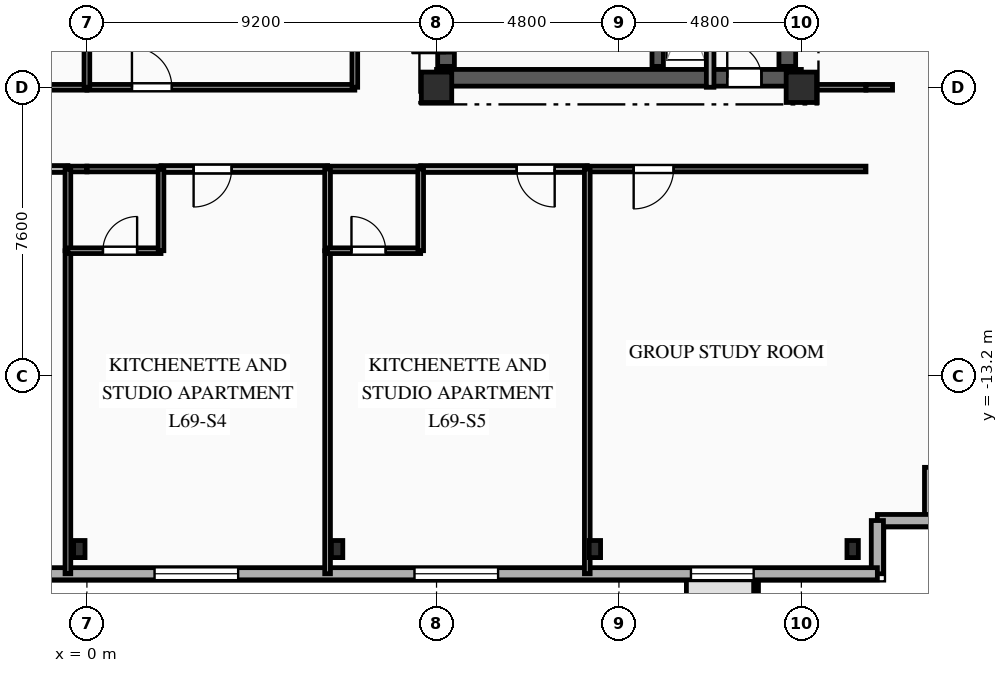
"""IFC4 building model, lengths in metres.
Left out: names, types, materials, properties, quantities, classifications, styles, units other than length and angle.
Written with IfcOpenShell. Run it as: python <this file> out.ifc"""

import sys

from ifc_helpers import new_model, si_unit, direction, frame, frame_2d, origin, origin_2d, place, context, subcontext, project, spatial, rectangle, i_section, extrude, element, fill, save


model = new_model("IFC4")
c1 = context("Model", 3, precision=1e-05, world=origin(), true_north=direction((0.0, 1.0)))
c2 = subcontext(c1, "Body", "Model", "MODEL_VIEW")
j1 = project(units=[si_unit("LENGTHUNIT", "METRE"), si_unit("PLANEANGLEUNIT", "RADIAN")], contexts=[c1])
p1 = place(None, origin())
s1 = spatial("IfcSite", under=j1, at=p1, CompositionType="ELEMENT")
p2 = place(p1, origin())
s2 = spatial("IfcBuilding", under=s1, at=p2, CompositionType="ELEMENT")
p3 = place(p2, frame((0.0, 0.0, 245.05)))
s3 = spatial("IfcBuildingStorey", under=s2, at=p3, CompositionType="ELEMENT", Elevation=245.05)
for number, where, z_axis, x_axis in (
    (1, (9.2, -5.6, 0.0), (0.0, 0.0, 1.0), (1.0, 0.0, 0.0)),
    (2, (18.8, -5.6, 0.0), (0.0, 0.0, 1.0), (1.0, 0.0, 0.0)),
):
    element("IfcColumn", number, at=place(p3, frame(where, z_axis=z_axis, x_axis=x_axis)), inside=s3, PredefinedType="COLUMN", context=c2, shape_type="SweptSolid", body=[
        extrude(rectangle(XDim=0.8, YDim=0.8, at=origin_2d()), origin(), (0.0, 0.0, 1.0), 3.35),
    ])
for number, where, z_axis, x_axis in (
    (3, (-0.2, -17.75, 0.0), (0.0, 0.0, 1.0), (1.0, 0.0, 0.0)),
    (4, (6.583, -17.75, 0.0), (0.0, 0.0, 1.0), (1.0, 0.0, 0.0)),
    (5, (13.367, -17.75, 0.0), (0.0, 0.0, 1.0), (1.0, 0.0, 0.0)),
    (6, (20.15, -17.75, 0.0), (0.0, 0.0, 1.0), (1.0, 0.0, 0.0)),
):
    element("IfcColumn", number, at=place(p3, frame(where, z_axis=z_axis, x_axis=x_axis)), inside=s3, PredefinedType="COLUMN", context=c2, shape_type="SweptSolid", body=[
        extrude(i_section(OverallWidth=0.3, OverallDepth=0.45, WebThickness=0.014, FlangeThickness=0.026, FilletRadius=0.027, at=origin_2d()), origin(), (0.0, 0.0, 1.0), 3.35),
    ])
for number, where, z_axis, x_axis in (
    (7, (22.2, -15.6, 0.0), (0.0, 0.0, 1.0), (0.0, -1.0, 0.0)),
    (8, (22.2, -17.0, 0.0), (0.0, 0.0, 1.0), (-1.0, 0.0, 0.0)),
    (9, (20.8, -17.0, 0.0), (0.0, 0.0, 1.0), (0.0, -1.0, 0.0)),
):
    element("IfcWall", number, at=place(p3, frame(where, z_axis=z_axis, x_axis=x_axis)), inside=s3, PredefinedType="SOLIDWALL", context=c2, shape_type="SweptSolid", body=[
        extrude(rectangle(XDim=1.4, YDim=0.32, at=frame_2d((0.7, 0.0))), origin(), (0.0, 0.0, 1.0), 3.04),
    ])
p4 = place(p3, frame((20.8, -18.4, 0.0), z_axis=(0.0, 0.0, 1.0), x_axis=(-1.0, 0.0, 0.0)))
e10 = element("IfcWall", 10, at=p4, inside=s3, PredefinedType="SOLIDWALL", context=c2, shape_type="SweptSolid", body=[
    extrude(rectangle(XDim=42.0, YDim=0.32, at=frame_2d((21.0, 0.0))), origin(), (0.0, 0.0, 1.0), 3.04),
])
p5 = place(p4, frame((3.255, 0.0, 0.85)))
e11 = element("IfcOpeningElement", 11, at=p5, cuts=e10, PredefinedType="OPENING", context=c2, shape_type="SweptSolid", body=[
    extrude(rectangle(XDim=1.65, YDim=1.85, at=frame_2d((0.825, 0.925))), frame((0.0, 0.17, 0.0), z_axis=(0.0, -1.0, 0.0), x_axis=(1.0, 0.0, 0.0)), (0.0, 0.0, 1.0), 0.34),
])
p6 = place(p4, frame((9.98, 0.0, 0.85)))
e12 = element("IfcOpeningElement", 12, at=p6, cuts=e10, PredefinedType="OPENING", context=c2, shape_type="SweptSolid", body=[
    extrude(rectangle(XDim=2.2, YDim=1.85, at=frame_2d((1.1, 0.925))), frame((0.0, 0.17, 0.0), z_axis=(0.0, -1.0, 0.0), x_axis=(1.0, 0.0, 0.0)), (0.0, 0.0, 1.0), 0.34),
])
p7 = place(p4, frame((16.82, 0.0, 0.85)))
e13 = element("IfcOpeningElement", 13, at=p7, cuts=e10, PredefinedType="OPENING", context=c2, shape_type="SweptSolid", body=[
    extrude(rectangle(XDim=2.2, YDim=1.85, at=frame_2d((1.1, 0.925))), frame((0.0, 0.17, 0.0), z_axis=(0.0, -1.0, 0.0), x_axis=(1.0, 0.0, 0.0)), (0.0, 0.0, 1.0), 0.34),
])
p8 = place(p4, frame((23.66, 0.0, 0.85)))
e14 = element("IfcOpeningElement", 14, at=p8, cuts=e10, PredefinedType="OPENING", context=c2, shape_type="SweptSolid", body=[
    extrude(rectangle(XDim=2.2, YDim=1.85, at=frame_2d((1.1, 0.925))), frame((0.0, 0.17, 0.0), z_axis=(0.0, -1.0, 0.0), x_axis=(1.0, 0.0, 0.0)), (0.0, 0.0, 1.0), 0.34),
])
p9 = place(p4, frame((30.5, 0.0, 0.85)))
e15 = element("IfcOpeningElement", 15, at=p9, cuts=e10, PredefinedType="OPENING", context=c2, shape_type="SweptSolid", body=[
    extrude(rectangle(XDim=2.2, YDim=1.85, at=frame_2d((1.1, 0.925))), frame((0.0, 0.17, 0.0), z_axis=(0.0, -1.0, 0.0), x_axis=(1.0, 0.0, 0.0)), (0.0, 0.0, 1.0), 0.34),
])
p10 = place(p4, frame((37.375, 0.0, 0.85)))
e16 = element("IfcOpeningElement", 16, at=p10, cuts=e10, PredefinedType="OPENING", context=c2, shape_type="SweptSolid", body=[
    extrude(rectangle(XDim=1.65, YDim=1.85, at=frame_2d((0.825, 0.925))), frame((0.0, 0.17, 0.0), z_axis=(0.0, -1.0, 0.0), x_axis=(1.0, 0.0, 0.0)), (0.0, 0.0, 1.0), 0.34),
])
p11 = place(p3, frame((9.2, -5.35, 0.0), z_axis=(0.0, 0.0, 1.0), x_axis=(1.0, 0.0, 0.0)))
e17 = element("IfcWall", 17, at=p11, inside=s3, PredefinedType="SHEAR", context=c2, shape_type="SweptSolid", body=[
    extrude(rectangle(XDim=9.6, YDim=0.44, at=frame_2d((4.8, 0.0))), origin(), (0.0, 0.0, 1.0), 3.04),
])
p12 = place(p11, frame((7.65, 0.0, 0.0)))
e18 = element("IfcOpeningElement", 18, at=p12, cuts=e17, PredefinedType="OPENING", context=c2, shape_type="SweptSolid", body=[
    extrude(rectangle(XDim=0.9, YDim=2.1, at=frame_2d((0.45, 1.05))), frame((0.0, 0.23, 0.0), z_axis=(0.0, -1.0, 0.0), x_axis=(1.0, 0.0, 0.0)), (0.0, 0.0, 1.0), 0.46),
])
p13 = place(p3, frame((9.45, -5.05, 0.0), z_axis=(0.0, 0.0, 1.0), x_axis=(0.0, 1.0, 0.0)))
e19 = element("IfcWall", 19, at=p13, inside=s3, PredefinedType="SHEAR", context=c2, shape_type="SweptSolid", body=[
    extrude(rectangle(XDim=10.1, YDim=0.44, at=frame_2d((5.05, 0.0))), origin(), (0.0, 0.0, 1.0), 3.04),
])
p14 = place(p13, frame((7.15, 0.0, 0.0)))
e20 = element("IfcOpeningElement", 20, at=p14, cuts=e19, PredefinedType="OPENING", context=c2, shape_type="SweptSolid", body=[
    extrude(rectangle(XDim=0.9, YDim=2.1, at=frame_2d((0.45, 1.05))), frame((0.0, 0.23, 0.0), z_axis=(0.0, -1.0, 0.0), x_axis=(1.0, 0.0, 0.0)), (0.0, 0.0, 1.0), 0.46),
])
p15 = place(p13, frame((2.4, 0.0, 0.0)))
e21 = element("IfcOpeningElement", 21, at=p15, cuts=e19, PredefinedType="OPENING", context=c2, shape_type="SweptSolid", body=[
    extrude(rectangle(XDim=1.2, YDim=2.15, at=frame_2d((0.6, 1.075))), frame((0.0, 0.23, 0.0), z_axis=(0.0, -1.0, 0.0), x_axis=(1.0, 0.0, 0.0)), (0.0, 0.0, 1.0), 0.46),
])
p16 = place(p13, frame((0.35, 0.0, 0.0)))
e22 = element("IfcOpeningElement", 22, at=p16, cuts=e19, PredefinedType="OPENING", context=c2, shape_type="SweptSolid", body=[
    extrude(rectangle(XDim=0.9, YDim=2.1, at=frame_2d((0.45, 1.05))), frame((0.0, 0.23, 0.0), z_axis=(0.0, -1.0, 0.0), x_axis=(1.0, 0.0, 0.0)), (0.0, 0.0, 1.0), 0.46),
])
p17 = place(p3, frame((18.43, -5.05, 0.0), z_axis=(0.0, 0.0, 1.0), x_axis=(0.0, 1.0, 0.0)))
e23 = element("IfcWall", 23, at=p17, inside=s3, PredefinedType="SHEAR", context=c2, shape_type="SweptSolid", body=[
    extrude(rectangle(XDim=10.1, YDim=0.44, at=frame_2d((5.05, 0.0))), origin(), (0.0, 0.0, 1.0), 3.04),
])
p18 = place(p3, frame((15.02, -5.05, 0.0), z_axis=(0.0, 0.0, 1.0), x_axis=(0.0, 1.0, 0.0)))
e24 = element("IfcWall", 24, at=p18, inside=s3, PredefinedType="SHEAR", context=c2, shape_type="SweptSolid", body=[
    extrude(rectangle(XDim=10.1, YDim=0.3, at=frame_2d((5.05, 0.0))), origin(), (0.0, 0.0, 1.0), 3.04),
])
p19 = place(p3, frame((16.4, -2.11, 0.0), z_axis=(0.0, 0.0, 1.0), x_axis=(0.0, -1.0, 0.0)))
e25 = element("IfcWall", 25, at=p19, inside=s3, PredefinedType="PARTITIONING", context=c2, shape_type="SweptSolid", body=[
    extrude(rectangle(XDim=3.49, YDim=0.2, at=frame_2d((1.745, 0.0))), origin(), (0.0, 0.0, 1.0), 3.04),
])
p20 = place(p3, frame((-0.5, -7.75, 0.0), z_axis=(0.0, 0.0, 1.0), x_axis=(-1.0, 0.0, 0.0)))
e26 = element("IfcWall", 26, at=p20, inside=s3, PredefinedType="PARTITIONING", context=c2, shape_type="SweptSolid", body=[
    extrude(rectangle(XDim=4.383, YDim=0.18, at=frame_2d((2.191, 0.0))), origin(), (0.0, 0.0, 1.0), 3.04),
])
p21 = place(p20, frame((0.858, 0.0, 0.0)))
e27 = element("IfcOpeningElement", 27, at=p21, cuts=e26, PredefinedType="OPENING", context=c2, shape_type="SweptSolid", body=[
    extrude(rectangle(XDim=1.0, YDim=2.15, at=frame_2d((0.5, 1.075))), frame((0.0, 0.1, 0.0), z_axis=(0.0, -1.0, 0.0), x_axis=(1.0, 0.0, 0.0)), (0.0, 0.0, 1.0), 0.2),
])
p22 = place(p3, frame((0.0, -7.75, 0.0), z_axis=(0.0, 0.0, 1.0), x_axis=(-1.0, 0.0, 0.0)))
e28 = element("IfcWall", 28, at=p22, inside=s3, PredefinedType="PLUMBINGWALL", context=c2, shape_type="SweptSolid", body=[
    extrude(rectangle(XDim=0.5, YDim=0.15, at=frame_2d((0.25, 0.0))), origin(), (0.0, 0.0, 1.0), 3.04),
])
p23 = place(p3, frame((-7.05, -5.6, 0.0), z_axis=(0.0, 0.0, 1.0), x_axis=(1.0, 0.0, 0.0)))
e29 = element("IfcWall", 29, at=p23, inside=s3, PredefinedType="PARTITIONING", context=c2, shape_type="SweptSolid", body=[
    extrude(rectangle(XDim=7.05, YDim=0.15, at=frame_2d((3.525, 0.0))), origin(), (0.0, 0.0, 1.0), 2.525),
])
p24 = place(p3, frame((18.8, -5.6, 0.0), z_axis=(0.0, 0.0, 1.0), x_axis=(1.0, 0.0, 0.0)))
e30 = element("IfcWall", 30, at=p24, inside=s3, PredefinedType="PARTITIONING", context=c2, shape_type="SweptSolid", body=[
    extrude(rectangle(XDim=1.7, YDim=0.15, at=frame_2d((0.85, 0.0))), origin(), (0.0, 0.0, 1.0), 3.04),
])
p25 = place(p3, frame((20.5, -5.6, 0.0), z_axis=(0.0, 0.0, 1.0), x_axis=(1.0, 0.0, 0.0)))
e31 = element("IfcWall", 31, at=p25, inside=s3, PredefinedType="PARTITIONING", context=c2, shape_type="SweptSolid", body=[
    extrude(rectangle(XDim=0.7, YDim=0.15, at=frame_2d((0.35, 0.0))), origin(), (0.0, 0.0, 1.0), 3.04),
])
p26 = place(p3, frame((6.333, -7.75, 0.0), z_axis=(0.0, 0.0, 1.0), x_axis=(-1.0, 0.0, 0.0)))
e32 = element("IfcWall", 32, at=p26, inside=s3, PredefinedType="PARTITIONING", context=c2, shape_type="SweptSolid", body=[
    extrude(rectangle(XDim=4.383, YDim=0.18, at=frame_2d((2.191, 0.0))), origin(), (0.0, 0.0, 1.0), 3.04),
])
p27 = place(p26, frame((2.525, 0.0, 0.0)))
e33 = element("IfcOpeningElement", 33, at=p27, cuts=e32, PredefinedType="OPENING", context=c2, shape_type="SweptSolid", body=[
    extrude(rectangle(XDim=1.0, YDim=2.15, at=frame_2d((0.5, 1.075))), frame((0.0, 0.1, 0.0), z_axis=(0.0, -1.0, 0.0), x_axis=(1.0, 0.0, 0.0)), (0.0, 0.0, 1.0), 0.2),
])
p28 = place(p3, frame((1.95, -7.75, 0.0), z_axis=(0.0, 0.0, 1.0), x_axis=(-1.0, 0.0, 0.0)))
e34 = element("IfcWall", 34, at=p28, inside=s3, PredefinedType="PLUMBINGWALL", context=c2, shape_type="SweptSolid", body=[
    extrude(rectangle(XDim=1.95, YDim=0.15, at=frame_2d((0.975, 0.0))), origin(), (0.0, 0.0, 1.0), 3.04),
])
p29 = place(p3, frame((13.167, -7.75, 0.0), z_axis=(0.0, 0.0, 1.0), x_axis=(-1.0, 0.0, 0.0)))
e35 = element("IfcWall", 35, at=p29, inside=s3, PredefinedType="PARTITIONING", context=c2, shape_type="SweptSolid", body=[
    extrude(rectangle(XDim=4.384, YDim=0.18, at=frame_2d((2.192, 0.0))), origin(), (0.0, 0.0, 1.0), 3.04),
])
p30 = place(p29, frame((0.858, 0.0, 0.0)))
e36 = element("IfcOpeningElement", 36, at=p30, cuts=e35, PredefinedType="OPENING", context=c2, shape_type="SweptSolid", body=[
    extrude(rectangle(XDim=1.0, YDim=2.15, at=frame_2d((0.5, 1.075))), frame((0.0, 0.1, 0.0), z_axis=(0.0, -1.0, 0.0), x_axis=(1.0, 0.0, 0.0)), (0.0, 0.0, 1.0), 0.2),
])
p31 = place(p3, frame((8.783, -7.75, 0.0), z_axis=(0.0, 0.0, 1.0), x_axis=(-1.0, 0.0, 0.0)))
e37 = element("IfcWall", 37, at=p31, inside=s3, PredefinedType="PLUMBINGWALL", context=c2, shape_type="SweptSolid", body=[
    extrude(rectangle(XDim=2.45, YDim=0.15, at=frame_2d((1.225, 0.0))), origin(), (0.0, 0.0, 1.0), 3.04),
])
p32 = place(p3, frame((20.5, -7.75, 0.0), z_axis=(0.0, 0.0, 1.0), x_axis=(-1.0, 0.0, 0.0)))
e38 = element("IfcWall", 38, at=p32, inside=s3, PredefinedType="PARTITIONING", context=c2, shape_type="SweptSolid", body=[
    extrude(rectangle(XDim=7.333, YDim=0.15, at=frame_2d((3.667, 0.0))), origin(), (0.0, 0.0, 1.0), 3.04),
])
p33 = place(p32, frame((5.062, 0.0, 0.0)))
e39 = element("IfcOpeningElement", 39, at=p33, cuts=e38, PredefinedType="OPENING", context=c2, shape_type="SweptSolid", body=[
    extrude(rectangle(XDim=1.05, YDim=2.15, at=frame_2d((0.525, 1.075))), frame((0.0, 0.085, 0.0), z_axis=(0.0, -1.0, 0.0), x_axis=(1.0, 0.0, 0.0)), (0.0, 0.0, 1.0), 0.17),
])
p34 = place(p3, frame((0.0, -5.6, 0.0), z_axis=(0.0, 0.0, 1.0), x_axis=(1.0, 0.0, 0.0)))
e40 = element("IfcWall", 40, at=p34, inside=s3, PredefinedType="PARTITIONING", context=c2, shape_type="SweptSolid", body=[
    extrude(rectangle(XDim=7.05, YDim=0.15, at=frame_2d((3.525, 0.0))), origin(), (0.0, 0.0, 1.0), 2.525),
])
p35 = place(p34, frame((1.185, 0.0, 0.0)))
e41 = element("IfcOpeningElement", 41, at=p35, cuts=e40, PredefinedType="OPENING", context=c2, shape_type="SweptSolid", body=[
    extrude(rectangle(XDim=1.05, YDim=2.15, at=frame_2d((0.525, 1.075))), frame((0.0, 0.085, 0.0), z_axis=(0.0, -1.0, 0.0), x_axis=(1.0, 0.0, 0.0)), (0.0, 0.0, 1.0), 0.17),
])
p36 = place(p3, frame((7.05, -5.6, 0.0), z_axis=(0.0, 0.0, 1.0), x_axis=(0.0, 1.0, 0.0)))
e42 = element("IfcWall", 42, at=p36, inside=s3, PredefinedType="PARTITIONING", context=c2, shape_type="SweptSolid", body=[
    extrude(rectangle(XDim=7.05, YDim=0.15, at=frame_2d((3.525, 0.0))), origin(), (0.0, 0.0, 1.0), 3.04),
])
p37 = place(p3, frame((-0.5, -9.9, 0.0), z_axis=(0.0, 0.0, 1.0), x_axis=(0.0, -1.0, 0.0)))
e43 = element("IfcWall", 43, at=p37, inside=s3, PredefinedType="PARTITIONING", context=c2, shape_type="SweptSolid", body=[
    extrude(rectangle(XDim=8.5, YDim=0.15, at=frame_2d((4.25, 0.0))), origin(), (0.0, 0.0, 1.0), 3.04),
])
p38 = place(p3, frame((-0.5, -7.75, 0.0), z_axis=(0.0, 0.0, 1.0), x_axis=(0.0, -1.0, 0.0)))
e44 = element("IfcWall", 44, at=p38, inside=s3, PredefinedType="PLUMBINGWALL", context=c2, shape_type="SweptSolid", body=[
    extrude(rectangle(XDim=2.15, YDim=0.15, at=frame_2d((1.075, 0.0))), origin(), (0.0, 0.0, 1.0), 3.04),
])
p39 = place(p3, frame((-0.5, -9.9, 0.0), z_axis=(0.0, 0.0, 1.0), x_axis=(1.0, 0.0, 0.0)))
e45 = element("IfcWall", 45, at=p39, inside=s3, PredefinedType="PLUMBINGWALL", context=c2, shape_type="SweptSolid", body=[
    extrude(rectangle(XDim=2.45, YDim=0.15, at=frame_2d((1.225, 0.0))), origin(), (0.0, 0.0, 1.0), 3.04),
])
p40 = place(p39, frame((0.921, 0.0, 0.0)))
e46 = element("IfcOpeningElement", 46, at=p40, cuts=e45, PredefinedType="OPENING", context=c2, shape_type="SweptSolid", body=[
    extrude(rectangle(XDim=0.9, YDim=2.1, at=frame_2d((0.45, 1.05))), frame((0.0, 0.085, 0.0), z_axis=(0.0, -1.0, 0.0), x_axis=(1.0, 0.0, 0.0)), (0.0, 0.0, 1.0), 0.17),
])
p41 = place(p3, frame((1.95, -9.9, 0.0), z_axis=(0.0, 0.0, 1.0), x_axis=(0.0, 1.0, 0.0)))
e47 = element("IfcWall", 47, at=p41, inside=s3, PredefinedType="PLUMBINGWALL", context=c2, shape_type="SweptSolid", body=[
    extrude(rectangle(XDim=2.15, YDim=0.15, at=frame_2d((1.075, 0.0))), origin(), (0.0, 0.0, 1.0), 3.04),
])
p42 = place(p3, frame((6.333, -9.9, 0.0), z_axis=(0.0, 0.0, 1.0), x_axis=(0.0, -1.0, 0.0)))
e48 = element("IfcWall", 48, at=p42, inside=s3, PredefinedType="PARTITIONING", context=c2, shape_type="SweptSolid", body=[
    extrude(rectangle(XDim=8.5, YDim=0.15, at=frame_2d((4.25, 0.0))), origin(), (0.0, 0.0, 1.0), 3.04),
])
p43 = place(p3, frame((6.333, -7.75, 0.0), z_axis=(0.0, 0.0, 1.0), x_axis=(0.0, -1.0, 0.0)))
e49 = element("IfcWall", 49, at=p43, inside=s3, PredefinedType="PLUMBINGWALL", context=c2, shape_type="SweptSolid", body=[
    extrude(rectangle(XDim=2.15, YDim=0.15, at=frame_2d((1.075, 0.0))), origin(), (0.0, 0.0, 1.0), 3.04),
])
p44 = place(p3, frame((6.333, -9.9, 0.0), z_axis=(0.0, 0.0, 1.0), x_axis=(1.0, 0.0, 0.0)))
e50 = element("IfcWall", 50, at=p44, inside=s3, PredefinedType="PLUMBINGWALL", context=c2, shape_type="SweptSolid", body=[
    extrude(rectangle(XDim=2.45, YDim=0.15, at=frame_2d((1.225, 0.0))), origin(), (0.0, 0.0, 1.0), 3.04),
])
p45 = place(p44, frame((0.629, 0.0, 0.0)))
e51 = element("IfcOpeningElement", 51, at=p45, cuts=e50, PredefinedType="OPENING", context=c2, shape_type="SweptSolid", body=[
    extrude(rectangle(XDim=0.9, YDim=2.1, at=frame_2d((0.45, 1.05))), frame((0.0, 0.085, 0.0), z_axis=(0.0, -1.0, 0.0), x_axis=(1.0, 0.0, 0.0)), (0.0, 0.0, 1.0), 0.17),
])
p46 = place(p3, frame((8.783, -9.9, 0.0), z_axis=(0.0, 0.0, 1.0), x_axis=(0.0, 1.0, 0.0)))
e52 = element("IfcWall", 52, at=p46, inside=s3, PredefinedType="PLUMBINGWALL", context=c2, shape_type="SweptSolid", body=[
    extrude(rectangle(XDim=2.15, YDim=0.15, at=frame_2d((1.075, 0.0))), origin(), (0.0, 0.0, 1.0), 2.665),
])
p47 = place(p3, frame((13.167, -7.75, 0.0), z_axis=(0.0, 0.0, 1.0), x_axis=(0.0, -1.0, 0.0)))
e53 = element("IfcWall", 53, at=p47, inside=s3, PredefinedType="PARTITIONING", context=c2, shape_type="SweptSolid", body=[
    extrude(rectangle(XDim=10.65, YDim=0.15, at=frame_2d((5.325, 0.0))), origin(), (0.0, 0.0, 1.0), 3.04),
])
p48 = place(p3, frame((0.0, 1.45, 0.0), z_axis=(0.0, 0.0, 1.0), x_axis=(0.0, -1.0, 0.0)))
e54 = element("IfcWall", 54, at=p48, inside=s3, PredefinedType="PARTITIONING", context=c2, shape_type="SweptSolid", body=[
    extrude(rectangle(XDim=7.05, YDim=0.15, at=frame_2d((3.525, 0.0))), origin(), (0.0, 0.0, 1.0), 3.04),
])
p49 = place(p5, origin())
e55 = element("IfcWindow", 55, at=p49, inside=s3, PartitioningType="SINGLE_PANEL", PredefinedType="WINDOW", context=c2, shape_type="SweptSolid", body=[
    extrude(rectangle(XDim=1.65, YDim=1.85, at=frame_2d((0.825, 0.925))), frame((0.0, 0.03, 0.0), z_axis=(0.0, -1.0, 0.0), x_axis=(1.0, 0.0, 0.0)), (0.0, 0.0, 1.0), 0.06),
])
fill(e11, e55)
p50 = place(p6, origin())
e56 = element("IfcWindow", 56, at=p50, inside=s3, PartitioningType="SINGLE_PANEL", PredefinedType="WINDOW", context=c2, shape_type="SweptSolid", body=[
    extrude(rectangle(XDim=2.2, YDim=1.85, at=frame_2d((1.1, 0.925))), frame((0.0, 0.03, 0.0), z_axis=(0.0, -1.0, 0.0), x_axis=(1.0, 0.0, 0.0)), (0.0, 0.0, 1.0), 0.06),
])
fill(e12, e56)
p51 = place(p7, origin())
e57 = element("IfcWindow", 57, at=p51, inside=s3, PartitioningType="SINGLE_PANEL", PredefinedType="WINDOW", context=c2, shape_type="SweptSolid", body=[
    extrude(rectangle(XDim=2.2, YDim=1.85, at=frame_2d((1.1, 0.925))), frame((0.0, 0.03, 0.0), z_axis=(0.0, -1.0, 0.0), x_axis=(1.0, 0.0, 0.0)), (0.0, 0.0, 1.0), 0.06),
])
fill(e13, e57)
p52 = place(p12, origin())
e58 = element("IfcDoor", 58, at=p52, inside=s3, OperationType="SINGLE_SWING_LEFT", PredefinedType="DOOR", context=c2, shape_type="SweptSolid", body=[
    extrude(rectangle(XDim=0.9, YDim=2.1, at=frame_2d((0.45, 1.05))), frame((0.0, 0.025, 0.0), z_axis=(0.0, -1.0, 0.0), x_axis=(1.0, 0.0, 0.0)), (0.0, 0.0, 1.0), 0.05),
])
fill(e18, e58)
p53 = place(p16, origin())
e59 = element("IfcDoor", 59, at=p53, inside=s3, OperationType="SINGLE_SWING_LEFT", PredefinedType="DOOR", context=c2, shape_type="SweptSolid", body=[
    extrude(rectangle(XDim=0.9, YDim=2.1, at=frame_2d((0.45, 1.05))), frame((0.0, 0.025, 0.0), z_axis=(0.0, -1.0, 0.0), x_axis=(1.0, 0.0, 0.0)), (0.0, 0.0, 1.0), 0.05),
])
fill(e22, e59)
p54 = place(p27, origin())
e60 = element("IfcDoor", 60, at=p54, inside=s3, OperationType="SINGLE_SWING_RIGHT", PredefinedType="DOOR", context=c2, shape_type="SweptSolid", body=[
    extrude(rectangle(XDim=1.0, YDim=2.15, at=frame_2d((0.5, 1.075))), frame((0.0, 0.025, 0.0), z_axis=(0.0, -1.0, 0.0), x_axis=(1.0, 0.0, 0.0)), (0.0, 0.0, 1.0), 0.05),
])
fill(e33, e60)
p55 = place(p30, origin())
e61 = element("IfcDoor", 61, at=p55, inside=s3, OperationType="SINGLE_SWING_LEFT", PredefinedType="DOOR", context=c2, shape_type="SweptSolid", body=[
    extrude(rectangle(XDim=1.0, YDim=2.15, at=frame_2d((0.5, 1.075))), frame((0.0, 0.025, 0.0), z_axis=(0.0, -1.0, 0.0), x_axis=(1.0, 0.0, 0.0)), (0.0, 0.0, 1.0), 0.05),
])
fill(e36, e61)
p56 = place(p33, origin())
e62 = element("IfcDoor", 62, at=p56, inside=s3, OperationType="SINGLE_SWING_RIGHT", PredefinedType="DOOR", context=c2, shape_type="SweptSolid", body=[
    extrude(rectangle(XDim=1.05, YDim=2.15, at=frame_2d((0.525, 1.075))), frame((0.0, 0.025, 0.0), z_axis=(0.0, -1.0, 0.0), x_axis=(1.0, 0.0, 0.0)), (0.0, 0.0, 1.0), 0.05),
])
fill(e39, e62)
p57 = place(p35, origin())
e63 = element("IfcDoor", 63, at=p57, inside=s3, OperationType="SINGLE_SWING_LEFT", PredefinedType="DOOR", context=c2, shape_type="SweptSolid", body=[
    extrude(rectangle(XDim=1.05, YDim=2.15, at=frame_2d((0.525, 1.075))), frame((0.0, 0.025, 0.0), z_axis=(0.0, -1.0, 0.0), x_axis=(1.0, 0.0, 0.0)), (0.0, 0.0, 1.0), 0.05),
])
fill(e41, e63)
p58 = place(p40, origin())
e64 = element("IfcDoor", 64, at=p58, inside=s3, OperationType="SINGLE_SWING_RIGHT", PredefinedType="DOOR", context=c2, shape_type="SweptSolid", body=[
    extrude(rectangle(XDim=0.9, YDim=2.1, at=frame_2d((0.45, 1.05))), frame((0.0, 0.025, 0.0), z_axis=(0.0, -1.0, 0.0), x_axis=(1.0, 0.0, 0.0)), (0.0, 0.0, 1.0), 0.05),
])
fill(e46, e64)
p59 = place(p45, origin())
e65 = element("IfcDoor", 65, at=p59, inside=s3, OperationType="SINGLE_SWING_LEFT", PredefinedType="DOOR", context=c2, shape_type="SweptSolid", body=[
    extrude(rectangle(XDim=0.9, YDim=2.1, at=frame_2d((0.45, 1.05))), frame((0.0, 0.025, 0.0), z_axis=(0.0, -1.0, 0.0), x_axis=(1.0, 0.0, 0.0)), (0.0, 0.0, 1.0), 0.05),
])
fill(e51, e65)
save(model, sys.argv[1])
